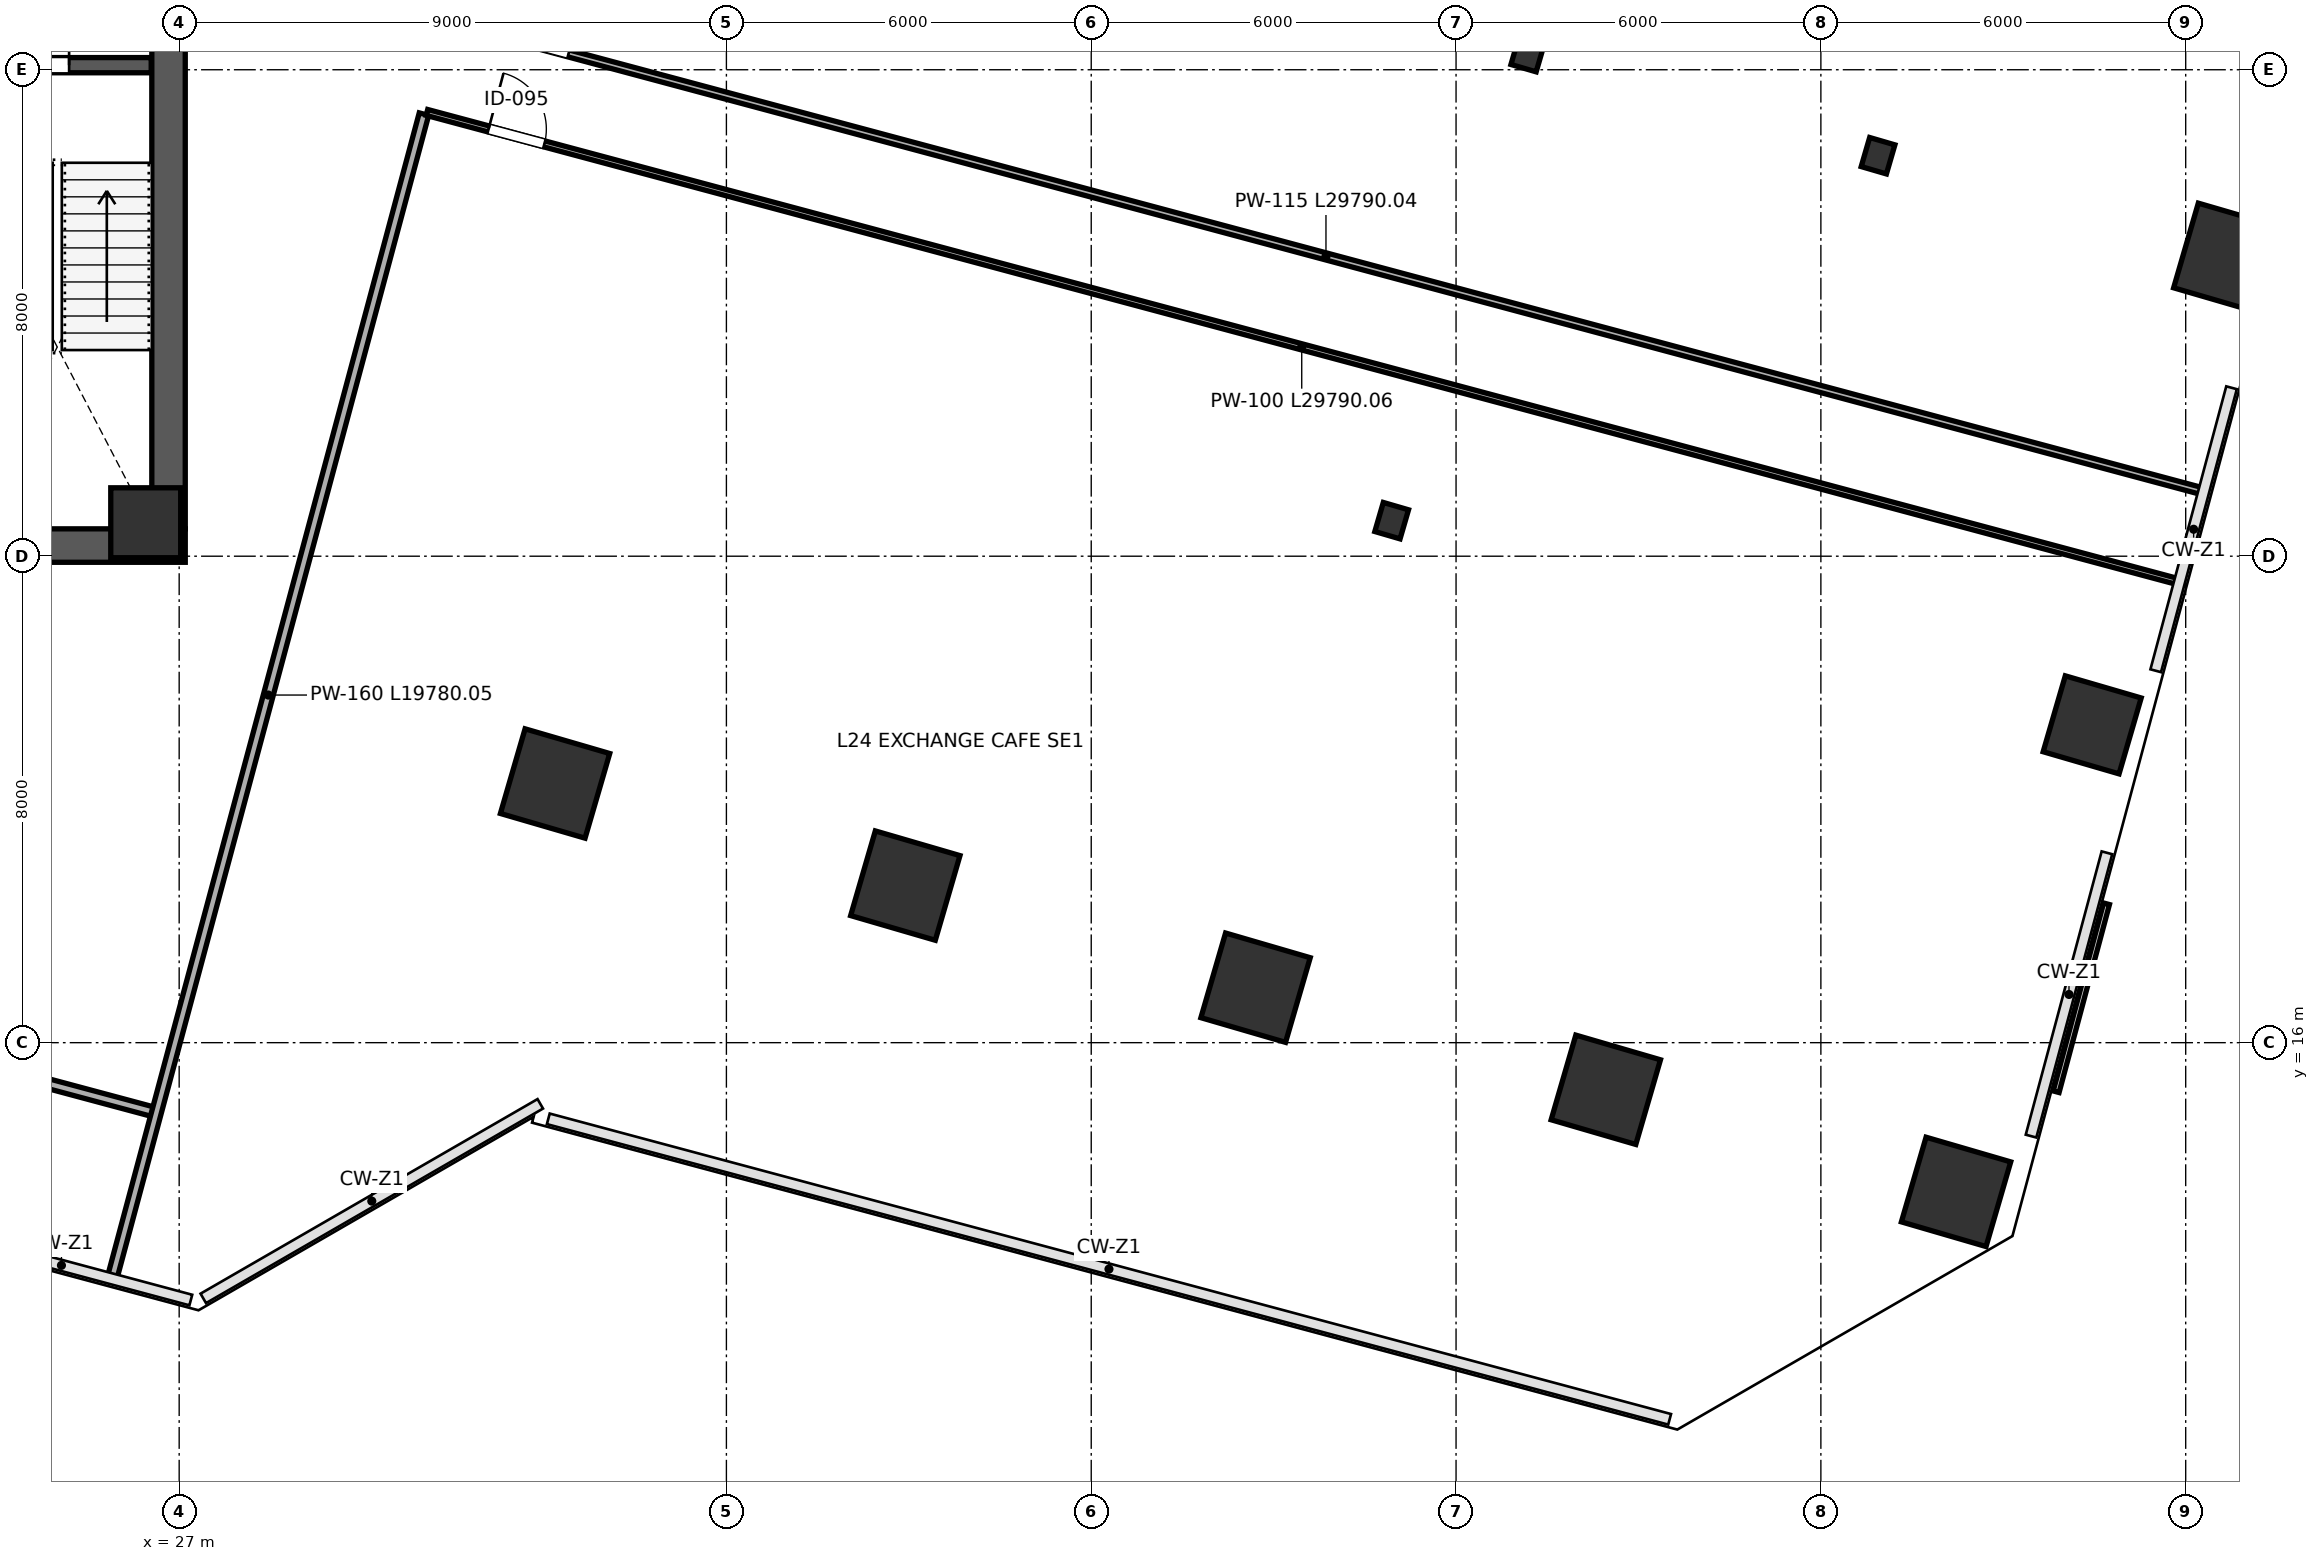
"""IFC4 building model, lengths in metres.
Left out: names, types, materials, properties, quantities, classifications, styles, units other than length and angle.
Written with IfcOpenShell. Run it as: python <this file> out.ifc"""

import sys

from ifc_helpers import new_model, si_unit, direction, frame, frame_2d, origin, origin_2d, place, context, subcontext, project, spatial, rectangle, i_section, extrude, clip, halfspace, source, transform, mapped, element, fill, save


model = new_model("IFC4")
c1 = context("Model", 3, precision=1e-05, world=origin(), true_north=direction((0.0, 1.0)))
c2 = subcontext(c1, "Body", "Model", "MODEL_VIEW")
j1 = project(units=[si_unit("LENGTHUNIT", "METRE"), si_unit("PLANEANGLEUNIT", "RADIAN")], contexts=[c1])
p1 = place(None, origin())
s1 = spatial("IfcSite", under=j1, at=p1, CompositionType="ELEMENT")
p2 = place(p1, origin())
s2 = spatial("IfcBuilding", under=s1, at=p2, CompositionType="ELEMENT")
p3 = place(p2, frame((0.0, 0.0, 108.4)))
s3 = spatial("IfcBuildingStorey", under=s2, at=p3, CompositionType="ELEMENT", Elevation=108.4)
m1 = source(origin(), c2, "Body", "SweptSolid", [
    extrude(rectangle(XDim=1.15, YDim=1.15, at=origin_2d()), origin(), (0.0, 0.0, 1.0), 4.199),
])
p4 = place(p3, frame((26.45, 24.55, 0.001), z_axis=(0.0, 0.0, 1.0), x_axis=(1.0, 0.0, 0.0)))
e1 = element("IfcColumn", 1, at=p4, inside=s3, PredefinedType="COLUMN", context=c2, shape_type="MappedRepresentation", body=[
    mapped(m1, transform((0.0, 0.0, 0.0), scale=1.0)),
])
p5 = place(p3, frame((33.182, 20.262, 0.0), z_axis=(-0.061444512233, -0.059822979394, 0.996316105989), x_axis=(-0.469962247041, 0.882360255063, 0.02399722154)))
e2 = element("IfcColumn", 2, at=p5, inside=s3, PredefinedType="COLUMN", context=c2, shape_type="Clipping", body=[
    clip(clip(extrude(rectangle(XDim=1.45, YDim=1.45, at=origin_2d()), origin(), (0.0, 0.0, 1.0), 4.216), halfspace(frame((0.0, 0.0, 0.078), z_axis=(0.0, 0.0, -1.0), x_axis=(1.0, 0.0, 0.0)), False)), halfspace(frame((0.0, 0.0, 4.138), z_axis=(0.0, 0.0, 1.0), x_axis=(1.0, 0.0, 0.0)), False)),
])
p6 = place(p3, frame((38.942, 18.583, 0.0), z_axis=(-0.070224135684, -0.089223922394, 0.993532919656), x_axis=(-0.582465789804, 0.812234004789, 0.031773025866)))
e3 = element("IfcColumn", 3, at=p6, inside=s3, PredefinedType="COLUMN", context=c2, shape_type="Clipping", body=[
    clip(clip(extrude(rectangle(XDim=1.45, YDim=1.45, at=origin_2d()), origin(), (0.0, 0.0, 1.0), 4.228), halfspace(frame((0.0, 0.0, 0.104), z_axis=(0.0, 0.0, -1.0), x_axis=(1.0, 0.0, 0.0)), False)), halfspace(frame((0.0, 0.0, 4.124), z_axis=(0.0, 0.0, 1.0), x_axis=(1.0, 0.0, 0.0)), False)),
])
p7 = place(p3, frame((44.703, 16.904, 0.0), z_axis=(-0.078880089771, -0.118406436723, 0.989827180461), x_axis=(-0.645424286258, 0.76278597494, 0.039812650544)))
e4 = element("IfcColumn", 4, at=p7, inside=s3, PredefinedType="COLUMN", context=c2, shape_type="Clipping", body=[
    clip(clip(extrude(rectangle(XDim=1.45, YDim=1.45, at=origin_2d()), origin(), (0.0, 0.0, 1.0), 4.243), halfspace(frame((0.0, 0.0, 0.13), z_axis=(0.0, 0.0, -1.0), x_axis=(1.0, 0.0, 0.0)), False)), halfspace(frame((0.0, 0.0, 4.114), z_axis=(0.0, 0.0, 1.0), x_axis=(1.0, 0.0, 0.0)), False)),
])
p8 = place(p3, frame((46.941, 24.584, 0.0), z_axis=(-0.039617133974, -0.130483176723, 0.990658681529), x_axis=(-0.83810363037, 0.54417479474, 0.038158846035)))
e5 = element("IfcColumn", 5, at=p8, inside=s3, PredefinedType="COLUMN", context=c2, shape_type="Clipping", body=[
    clip(clip(extrude(i_section(OverallWidth=0.432, OverallDepth=0.498, WebThickness=0.056, FlangeThickness=0.089, FilletRadius=0.015, at=origin_2d()), origin(), (0.0, 0.0, 1.0), 4.24), halfspace(frame((0.0, 0.0, 0.042), z_axis=(0.0, 0.0, -1.0), x_axis=(1.0, 0.0, 0.0)), False)), halfspace(frame((0.0, 0.0, 4.198), z_axis=(0.0, 0.0, 1.0), x_axis=(1.0, 0.0, 0.0)), False)),
])
p9 = place(p3, frame((49.18, 32.265, 0.0), z_axis=(-0.000172602513, -0.142339538659, 0.989817875138), x_axis=(-0.959713280046, 0.278143722739, 0.039830762045)))
e6 = element("IfcColumn", 6, at=p9, inside=s3, PredefinedType="COLUMN", context=c2, shape_type="Clipping", body=[
    clip(clip(extrude(i_section(OverallWidth=0.432, OverallDepth=0.498, WebThickness=0.056, FlangeThickness=0.089, FilletRadius=0.015, at=origin_2d()), origin(), (0.0, 0.0, 1.0), 4.243), halfspace(frame((0.0, 0.0, 0.044), z_axis=(0.0, 0.0, -1.0), x_axis=(1.0, 0.0, 0.0)), False)), halfspace(frame((0.0, 0.0, 4.2), z_axis=(0.0, 0.0, 1.0), x_axis=(1.0, 0.0, 0.0)), False)),
])
p10 = place(p3, frame((50.463, 15.225, 0.0), z_axis=(-0.087447322936, -0.147234490679, 0.985228384927), x_axis=(-0.684652165959, 0.727293019635, 0.047919466174)))
e7 = element("IfcColumn", 7, at=p10, inside=s3, PredefinedType="COLUMN", context=c2, shape_type="Clipping", body=[
    clip(clip(extrude(rectangle(XDim=1.45, YDim=1.45, at=origin_2d()), origin(), (0.0, 0.0, 1.0), 4.263), halfspace(frame((0.0, 0.0, 0.157), z_axis=(0.0, 0.0, -1.0), x_axis=(1.0, 0.0, 0.0)), False)), halfspace(frame((0.0, 0.0, 4.106), z_axis=(0.0, 0.0, 1.0), x_axis=(1.0, 0.0, 0.0)), False)),
])
p11 = place(p3, frame((54.94, 30.586, 0.0), z_axis=(-0.009105432119, -0.171056136735, 0.9852192087), x_axis=(-0.94403801502, 0.326335004431, 0.047934237029)))
e8 = element("IfcColumn", 8, at=p11, inside=s3, PredefinedType="COLUMN", context=c2, shape_type="Clipping", body=[
    clip(clip(extrude(i_section(OverallWidth=0.432, OverallDepth=0.498, WebThickness=0.056, FlangeThickness=0.089, FilletRadius=0.015, at=origin_2d()), origin(), (0.0, 0.0, 1.0), 4.263), halfspace(frame((0.0, 0.0, 0.053), z_axis=(0.0, 0.0, -1.0), x_axis=(1.0, 0.0, 0.0)), False)), halfspace(frame((0.0, 0.0, 4.21), z_axis=(0.0, 0.0, 1.0), x_axis=(1.0, 0.0, 0.0)), False)),
])
p12 = place(p3, frame((56.223, 13.546, 0.0), z_axis=(-0.095847866363, -0.175635662426, 0.979778189489), x_axis=(-0.711393243673, 0.700560321929, 0.055990072293)))
e9 = element("IfcColumn", 9, at=p12, inside=s3, PredefinedType="COLUMN", context=c2, shape_type="Clipping", body=[
    clip(clip(extrude(rectangle(XDim=1.45, YDim=1.45, at=origin_2d()), origin(), (0.0, 0.0, 1.0), 4.287), halfspace(frame((0.0, 0.0, 0.184), z_axis=(0.0, 0.0, -1.0), x_axis=(1.0, 0.0, 0.0)), False)), halfspace(frame((0.0, 0.0, 4.103), z_axis=(0.0, 0.0, 1.0), x_axis=(1.0, 0.0, 0.0)), False)),
])
p13 = place(p3, frame((58.462, 21.227, 0.0), z_axis=(-0.056940607111, -0.187636114723, 0.980586791525), x_axis=(-0.838999664702, 0.541358290655, 0.054870427098)))
e10 = element("IfcColumn", 10, at=p13, inside=s3, PredefinedType="COLUMN", context=c2, shape_type="Clipping", body=[
    clip(clip(extrude(rectangle(XDim=1.3, YDim=1.3, at=origin_2d()), origin(), (0.0, 0.0, 1.0), 4.283), halfspace(frame((0.0, 0.0, 0.162), z_axis=(0.0, 0.0, -1.0), x_axis=(1.0, 0.0, 0.0)), False)), halfspace(frame((0.0, 0.0, 4.122), z_axis=(0.0, 0.0, 1.0), x_axis=(1.0, 0.0, 0.0)), False)),
])
p14 = place(p3, frame((60.701, 28.907, 0.0), z_axis=(-0.017939274987, -0.199325277637, 0.979769164706), x_axis=(-0.93160934059, 0.359120820282, 0.056002437148)))
e11 = element("IfcColumn", 11, at=p14, inside=s3, PredefinedType="COLUMN", context=c2, shape_type="Clipping", body=[
    clip(clip(extrude(rectangle(XDim=1.45, YDim=1.45, at=origin_2d()), origin(), (0.0, 0.0, 1.0), 4.287), halfspace(frame((0.0, 0.0, 0.184), z_axis=(0.0, 0.0, -1.0), x_axis=(1.0, 0.0, 0.0)), False)), halfspace(frame((0.0, 0.0, 4.103), z_axis=(0.0, 0.0, 1.0), x_axis=(1.0, 0.0, 0.0)), False)),
])
p15 = place(p3, frame((26.825, 24.45, 0.0), z_axis=(0.0, 0.0, 1.0), x_axis=(0.0, 1.0, 0.0)))
e12 = element("IfcWall", 12, at=p15, inside=s3, PredefinedType="SHEAR", context=c2, shape_type="SweptSolid", body=[
    extrude(rectangle(XDim=15.1, YDim=0.55, at=frame_2d((7.55, 0.0))), origin(), (0.0, 0.0, 1.0), 3.96),
])
p16 = place(p15, frame((8.6, 0.0, 0.0)))
e13 = element("IfcOpeningElement", 13, at=p16, cuts=e12, PredefinedType="OPENING", context=c2, shape_type="SweptSolid", body=[
    extrude(rectangle(XDim=1.15, YDim=2.2, at=frame_2d((0.575, 1.1))), frame((0.0, 0.285, 0.0), z_axis=(0.0, -1.0, 0.0), x_axis=(1.0, 0.0, 0.0)), (0.0, 0.0, 1.0), 0.57),
])
p17 = place(p3, frame((8.9, 24.175, 0.0), z_axis=(0.0, 0.0, 1.0), x_axis=(1.0, 0.0, 0.0)))
e14 = element("IfcWall", 14, at=p17, inside=s3, PredefinedType="SHEAR", context=c2, shape_type="SweptSolid", body=[
    extrude(rectangle(XDim=18.2, YDim=0.55, at=frame_2d((9.1, 0.0))), origin(), (0.0, 0.0, 1.0), 3.96),
])
p18 = place(p3, frame((23.19, 32.075, 0.0), z_axis=(0.0, 0.0, 1.0), x_axis=(1.0, 0.0, 0.0)))
e15 = element("IfcWall", 15, at=p18, inside=s3, PredefinedType="SHEAR", context=c2, shape_type="SweptSolid", body=[
    extrude(rectangle(XDim=3.35, YDim=0.25, at=frame_2d((1.675, 0.0))), origin(), (0.0, 0.0, 1.0), 3.96),
])
p19 = place(p18, frame((0.85, 0.0, 0.0)))
e16 = element("IfcOpeningElement", 16, at=p19, cuts=e15, PredefinedType="OPENING", context=c2, shape_type="SweptSolid", body=[
    extrude(rectangle(XDim=1.15, YDim=2.2, at=frame_2d((0.575, 1.1))), frame((0.0, 0.135, 0.0), z_axis=(0.0, -1.0, 0.0), x_axis=(1.0, 0.0, 0.0)), (0.0, 0.0, 1.0), 0.27),
])
p20 = place(p3, frame((8.563, 19.689, 0.0), z_axis=(0.0, 0.0, 1.0), x_axis=(0.965928721089, -0.258808241319, 0.0)))
e17 = element("IfcWall", 17, at=p20, inside=s3, PredefinedType="PARTITIONING", context=c2, shape_type="SweptSolid", body=[
    extrude(rectangle(XDim=18.66, YDim=0.16, at=frame_2d((9.33, 0.0))), origin(), (0.0, 0.0, 1.0), 3.96),
])
p21 = place(p20, frame((1.45, 0.0, 0.0)))
e18 = element("IfcOpeningElement", 18, at=p21, cuts=e17, PredefinedType="OPENING", context=c2, shape_type="SweptSolid", body=[
    extrude(rectangle(XDim=0.95, YDim=2.15, at=frame_2d((0.475, 1.075))), frame((0.0, 0.09, 0.0), z_axis=(0.0, -1.0, 0.0), x_axis=(1.0, 0.0, 0.0)), (0.0, 0.0, 1.0), 0.18),
])
p22 = place(p3, frame((25.906, 12.164, 0.0), z_axis=(0.0, 0.0, 1.0), x_axis=(0.258805595447, 0.965929430013, 0.0)))
e19 = element("IfcWall", 19, at=p22, inside=s3, PredefinedType="PARTITIONING", context=c2, shape_type="SweptSolid", body=[
    extrude(rectangle(XDim=19.78, YDim=0.16, at=frame_2d((9.89, 0.0))), origin(), (0.0, 0.0, 1.0), 3.96),
])
p23 = place(p3, frame((31.473, 32.785, 0.0), z_axis=(0.0, 0.0, 1.0), x_axis=(0.965927931901, -0.258811186722, 0.0)))
e20 = element("IfcWall", 20, at=p23, inside=s3, PredefinedType="PARTITIONING", context=c2, shape_type="SweptSolid", body=[
    extrude(rectangle(XDim=29.79, YDim=0.115, at=frame_2d((14.895, 0.0))), origin(), (0.0, 0.0, 1.0), 3.095),
])
p24 = place(p23, frame((1.05, 0.0, 0.0)))
e21 = element("IfcOpeningElement", 21, at=p24, cuts=e20, PredefinedType="OPENING", context=c2, shape_type="SweptSolid", body=[
    extrude(rectangle(XDim=0.95, YDim=2.15, at=frame_2d((0.475, 1.075))), frame((0.0, 0.067, 0.0), z_axis=(0.0, -1.0, 0.0), x_axis=(1.0, 0.0, 0.0)), (0.0, 0.0, 1.0), 0.135),
])
p25 = place(p3, frame((31.074, 31.298, 0.0), z_axis=(0.0, 0.0, 1.0), x_axis=(0.96592643206, -0.258816784325, 0.0)))
e22 = element("IfcWall", 22, at=p25, inside=s3, PredefinedType="PARTITIONING", context=c2, shape_type="SweptSolid", body=[
    extrude(rectangle(XDim=29.79, YDim=0.1, at=frame_2d((14.895, 0.0))), origin(), (0.0, 0.0, 1.0), 3.095),
])
p26 = place(p25, frame((1.05, 0.0, 0.0)))
e23 = element("IfcOpeningElement", 23, at=p26, cuts=e22, PredefinedType="OPENING", context=c2, shape_type="SweptSolid", body=[
    extrude(rectangle(XDim=0.95, YDim=2.15, at=frame_2d((0.475, 1.075))), frame((0.0, 0.06, 0.0), z_axis=(0.0, -1.0, 0.0), x_axis=(1.0, 0.0, 0.0)), (0.0, 0.0, 1.0), 0.12),
])
m2 = source(origin(), c2, "Body", "SweptSolid", [
    extrude(rectangle(XDim=1.15, YDim=2.2, at=frame_2d((0.575, 1.1))), frame((0.0, 0.025, 0.0), z_axis=(0.0, -1.0, 0.0), x_axis=(1.0, 0.0, 0.0)), (0.0, 0.0, 1.0), 0.05),
])
p27 = place(p19, origin())
e24 = element("IfcDoor", 24, at=p27, inside=s3, OperationType="SINGLE_SWING_RIGHT", PredefinedType="DOOR", context=c2, shape_type="MappedRepresentation", body=[
    mapped(m2, transform((0.0, 0.0, 0.0), scale=1.0)),
])
fill(e16, e24)
m3 = source(origin(), c2, "Body", "SweptSolid", [
    extrude(rectangle(XDim=0.95, YDim=2.15, at=frame_2d((0.475, 1.075))), frame((0.0, 0.025, 0.0), z_axis=(0.0, -1.0, 0.0), x_axis=(1.0, 0.0, 0.0)), (0.0, 0.0, 1.0), 0.05),
])
p28 = place(p24, origin())
e25 = element("IfcDoor", 25, at=p28, inside=s3, OperationType="SINGLE_SWING_LEFT", PredefinedType="DOOR", context=c2, shape_type="MappedRepresentation", body=[
    mapped(m3, transform((0.0, 0.0, 0.0), scale=1.0)),
])
fill(e21, e25)
p29 = place(p26, origin())
e26 = element("IfcDoor", 26, at=p29, inside=s3, OperationType="SINGLE_SWING_LEFT", PredefinedType="DOOR", context=c2, shape_type="MappedRepresentation", body=[
    mapped(m3, transform((0.0, 0.0, 0.0), scale=1.0)),
])
fill(e23, e26)
save(model, sys.argv[1])
